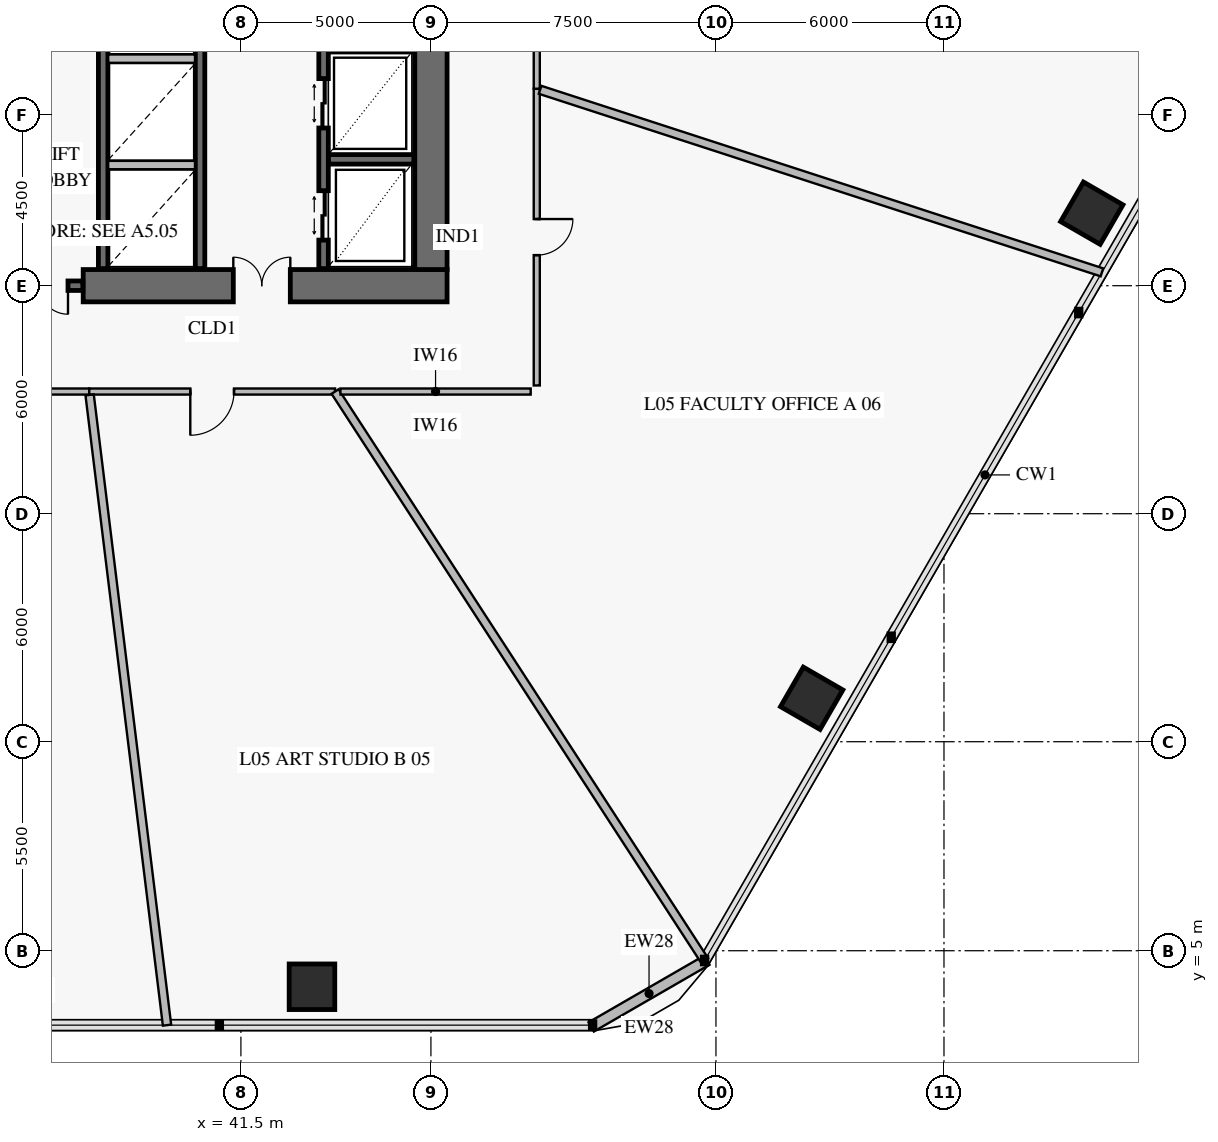
"""IFC4 building model, lengths in metres.
Left out: names, types, materials, properties, quantities, classifications, styles, units other than length and angle.
Written with IfcOpenShell. Run it as: python <this file> out.ifc"""

import sys

from ifc_helpers import new_model, si_unit, direction, frame, frame_2d, origin, origin_2d, place, context, subcontext, project, spatial, rectangle, extrude, element, fill, save


model = new_model("IFC4")
c1 = context("Model", 3, precision=1e-05, world=origin(), true_north=direction((0.0, 1.0)))
c2 = subcontext(c1, "Body", "Model", "MODEL_VIEW")
j1 = project(units=[si_unit("LENGTHUNIT", "METRE"), si_unit("PLANEANGLEUNIT", "RADIAN")], contexts=[c1])
p1 = place(None, origin())
s1 = spatial("IfcSite", under=j1, at=p1, CompositionType="ELEMENT")
p2 = place(p1, origin())
s2 = spatial("IfcBuilding", under=s1, at=p2, CompositionType="ELEMENT")
p3 = place(p2, frame((0.0, 0.0, 20.4)))
s3 = spatial("IfcBuildingStorey", under=s2, at=p3, CompositionType="ELEMENT", Elevation=20.4)
p4 = place(p3, frame((37.35, 22.5, 0.0), z_axis=(0.0, 0.0, 1.0), x_axis=(1.0, 0.0, 0.0)))
e1 = element("IfcWall", 1, at=p4, inside=s3, PredefinedType="SHEAR", context=c2, shape_type="SweptSolid", body=[
    extrude(rectangle(XDim=9.575, YDim=0.85, at=frame_2d((4.788, 0.0))), origin(), (0.0, 0.0, 1.0), 4.2),
])
p5 = place(p4, frame((3.95, 0.0, 0.0)))
e2 = element("IfcOpeningElement", 2, at=p5, cuts=e1, PredefinedType="OPENING", context=c2, shape_type="SweptSolid", body=[
    extrude(rectangle(XDim=1.5, YDim=2.15, at=frame_2d((0.75, 1.075))), frame((0.0, 0.437, 0.0), z_axis=(0.0, -1.0, 0.0), x_axis=(1.0, 0.0, 0.0)), (0.0, 0.0, 1.0), 0.874),
])
p6 = place(p3, frame((46.5, 22.925, 0.0), z_axis=(0.0, 0.0, 1.0), x_axis=(0.0, 1.0, 0.0)))
e3 = element("IfcWall", 3, at=p6, inside=s3, PredefinedType="SHEAR", context=c2, shape_type="SweptSolid", body=[
    extrude(rectangle(XDim=18.15, YDim=0.85, at=frame_2d((9.075, 0.0))), origin(), (0.0, 0.0, 1.0), 4.2),
])
p7 = place(p6, frame((8.825, 0.0, 0.0)))
e4 = element("IfcOpeningElement", 4, at=p7, cuts=e3, PredefinedType="OPENING", context=c2, shape_type="SweptSolid", body=[
    extrude(rectangle(XDim=1.1, YDim=2.15, at=frame_2d((0.55, 1.075))), frame((0.0, 0.437, 0.0), z_axis=(0.0, -1.0, 0.0), x_axis=(1.0, 0.0, 0.0)), (0.0, 0.0, 1.0), 0.874),
])
for number, where, z_axis, x_axis in (
    (5, (43.37, 4.052, 0.0), (0.0, 0.0, 1.0), (1.0, 0.0, 0.0)),
    (6, (56.519, 11.643, 0.0), (0.0, 0.0, 1.0), (0.5, 0.866, 0.0)),
    (7, (63.889, 24.408, 0.0), (0.0, 0.0, 1.0), (0.5, 0.866, 0.0)),
):
    element("IfcColumn", number, at=place(p3, frame(where, z_axis=z_axis, x_axis=x_axis)), inside=s3, PredefinedType="COLUMN", context=c2, shape_type="SweptSolid", body=[
        extrude(rectangle(XDim=1.2, YDim=1.2, at=origin_2d()), origin(), (0.0, 0.0, 1.0), 3.92),
    ])
p8 = place(p3, frame((53.761, 4.751, 0.0), z_axis=(0.0, 0.0, 1.0), x_axis=(-0.866007452331, -0.500031091541, 0.0)))
e8 = element("IfcWall", 8, at=p8, inside=s3, PredefinedType="SOLIDWALL", context=c2, shape_type="SweptSolid", body=[
    extrude(rectangle(XDim=3.515, YDim=0.28, at=frame_2d((1.757, 0.0))), origin(), (0.0, 0.0, 1.0), 3.92),
])
p9 = place(p3, frame((35.06, 22.5, 0.0), z_axis=(0.0, 0.0, 1.0), x_axis=(1.0, 0.0, 0.0)))
e9 = element("IfcWall", 9, at=p9, inside=s3, PredefinedType="SOLIDWALL", context=c2, shape_type="SweptSolid", body=[
    extrude(rectangle(XDim=2.28, YDim=0.25, at=frame_2d((1.14, 0.0))), origin(), (0.0, 0.0, 1.0), 4.2),
])
p10 = place(p9, frame((0.39, 0.0, 0.0)))
e10 = element("IfcOpeningElement", 10, at=p10, cuts=e9, PredefinedType="OPENING", context=c2, shape_type="SweptSolid", body=[
    extrude(rectangle(XDim=1.5, YDim=2.15, at=frame_2d((0.75, 1.075))), frame((0.0, 0.137, 0.0), z_axis=(0.0, -1.0, 0.0), x_axis=(1.0, 0.0, 0.0)), (0.0, 0.0, 1.0), 0.274),
])
for number, where, z_axis, x_axis in (
    (11, (37.875, 22.95, 0.0), (0.0, 0.0, 1.0), (0.0, 1.0, 0.0)),
    (12, (40.425, 22.95, 0.0), (0.0, 0.0, 1.0), (0.0, 1.0, 0.0)),
):
    element("IfcWall", number, at=place(p3, frame(where, z_axis=z_axis, x_axis=x_axis)), inside=s3, PredefinedType="SOLIDWALL", context=c2, shape_type="SweptSolid", body=[
        extrude(rectangle(XDim=8.2, YDim=0.25, at=frame_2d((4.1, 0.0))), origin(), (0.0, 0.0, 1.0), 4.2),
    ])
for number, where, z_axis, x_axis in (
    (13, (43.8, 25.825, 0.0), (0.0, 0.0, 1.0), (1.0, 0.0, 0.0)),
    (14, (43.8, 28.775, 0.0), (0.0, 0.0, 1.0), (1.0, 0.0, 0.0)),
):
    element("IfcWall", number, at=place(p3, frame(where, z_axis=z_axis, x_axis=x_axis)), inside=s3, PredefinedType="SOLIDWALL", context=c2, shape_type="SweptSolid", body=[
        extrude(rectangle(XDim=2.25, YDim=0.25, at=frame_2d((1.125, 0.0))), origin(), (0.0, 0.0, 1.0), 4.2),
    ])
p11 = place(p3, frame((43.675, 22.95, 0.0), z_axis=(0.0, 0.0, 1.0), x_axis=(0.0, 1.0, 0.0)))
e15 = element("IfcWall", 15, at=p11, inside=s3, PredefinedType="SOLIDWALL", context=c2, shape_type="SweptSolid", body=[
    extrude(rectangle(XDim=8.2, YDim=0.25, at=frame_2d((4.1, 0.0))), origin(), (0.0, 0.0, 1.0), 4.2),
])
p12 = place(p11, frame((0.75, 0.0, 0.0)))
e16 = element("IfcOpeningElement", 16, at=p12, cuts=e15, PredefinedType="OPENING", context=c2, shape_type="SweptSolid", body=[
    extrude(rectangle(XDim=1.3, YDim=2.3, at=frame_2d((0.65, 1.15))), frame((0.0, 0.137, 0.0), z_axis=(0.0, -1.0, 0.0), x_axis=(1.0, 0.0, 0.0)), (0.0, 0.0, 1.0), 0.274),
])
p13 = place(p11, frame((3.7, 0.0, 0.0)))
e17 = element("IfcOpeningElement", 17, at=p13, cuts=e15, PredefinedType="OPENING", context=c2, shape_type="SweptSolid", body=[
    extrude(rectangle(XDim=1.3, YDim=2.3, at=frame_2d((0.65, 1.15))), frame((0.0, 0.137, 0.0), z_axis=(0.0, -1.0, 0.0), x_axis=(1.0, 0.0, 0.0)), (0.0, 0.0, 1.0), 0.274),
])
p14 = place(p11, frame((6.62, 0.0, 0.0)))
e18 = element("IfcOpeningElement", 18, at=p14, cuts=e15, PredefinedType="OPENING", context=c2, shape_type="SweptSolid", body=[
    extrude(rectangle(XDim=0.9, YDim=2.1, at=frame_2d((0.45, 1.05))), frame((0.0, 0.137, 0.0), z_axis=(0.0, -1.0, 0.0), x_axis=(1.0, 0.0, 0.0)), (0.0, 0.0, 1.0), 0.274),
])
p15 = place(p3, frame((31.77, 19.715, 0.0), z_axis=(0.0, 0.0, 1.0), x_axis=(1.0, 0.0, 0.0)))
e19 = element("IfcWall", 19, at=p15, inside=s3, PredefinedType="PARTITIONING", context=c2, shape_type="SweptSolid", body=[
    extrude(rectangle(XDim=5.738, YDim=0.16, at=frame_2d((2.869, 0.0))), origin(), (0.0, 0.0, 1.0), 3.22),
])
p16 = place(p15, frame((2.294, 0.0, 0.0)))
e20 = element("IfcOpeningElement", 20, at=p16, cuts=e19, PredefinedType="OPENING", context=c2, shape_type="SweptSolid", body=[
    extrude(rectangle(XDim=1.15, YDim=2.2, at=frame_2d((0.575, 1.1))), frame((0.0, 0.092, 0.0), z_axis=(0.0, -1.0, 0.0), x_axis=(1.0, 0.0, 0.0)), (0.0, 0.0, 1.0), 0.184),
])
p17 = place(p3, frame((37.508, 19.715, 0.0), z_axis=(0.0, 0.0, 1.0), x_axis=(1.0, 0.0, 0.0)))
e21 = element("IfcWall", 21, at=p17, inside=s3, PredefinedType="PARTITIONING", context=c2, shape_type="SweptSolid", body=[
    extrude(rectangle(XDim=6.47, YDim=0.16, at=frame_2d((3.235, 0.0))), origin(), (0.0, 0.0, 1.0), 3.22),
])
p18 = place(p17, frame((2.66, 0.0, 0.0)))
e22 = element("IfcOpeningElement", 22, at=p18, cuts=e21, PredefinedType="OPENING", context=c2, shape_type="SweptSolid", body=[
    extrude(rectangle(XDim=1.15, YDim=2.2, at=frame_2d((0.575, 1.1))), frame((0.0, 0.092, 0.0), z_axis=(0.0, -1.0, 0.0), x_axis=(1.0, 0.0, 0.0)), (0.0, 0.0, 1.0), 0.184),
])
p19 = place(p3, frame((49.285, 19.875, 0.0), z_axis=(0.0, 0.0, 1.0), x_axis=(0.0, 1.0, 0.0)))
e23 = element("IfcWall", 23, at=p19, inside=s3, PredefinedType="PARTITIONING", context=c2, shape_type="SweptSolid", body=[
    extrude(rectangle(XDim=7.808, YDim=0.16, at=frame_2d((3.904, 0.0))), origin(), (0.0, 0.0, 1.0), 3.92),
])
p20 = place(p19, frame((3.429, 0.0, 0.0)))
e24 = element("IfcOpeningElement", 24, at=p20, cuts=e23, PredefinedType="OPENING", context=c2, shape_type="SweptSolid", body=[
    extrude(rectangle(XDim=0.95, YDim=2.1, at=frame_2d((0.475, 1.05))), frame((0.0, 0.092, 0.0), z_axis=(0.0, -1.0, 0.0), x_axis=(1.0, 0.0, 0.0)), (0.0, 0.0, 1.0), 0.184),
])
p21 = place(p3, frame((49.285, 27.683, 0.0), z_axis=(0.0, 0.0, 1.0), x_axis=(0.0, 1.0, 0.0)))
e25 = element("IfcWall", 25, at=p21, inside=s3, PredefinedType="PARTITIONING", context=c2, shape_type="SweptSolid", body=[
    extrude(rectangle(XDim=9.416, YDim=0.16, at=frame_2d((4.708, 0.0))), origin(), (0.0, 0.0, 1.0), 3.22),
])
p22 = place(p21, frame((4.233, 0.0, 0.0)))
e26 = element("IfcOpeningElement", 26, at=p22, cuts=e25, PredefinedType="OPENING", context=c2, shape_type="SweptSolid", body=[
    extrude(rectangle(XDim=0.95, YDim=2.1, at=frame_2d((0.475, 1.05))), frame((0.0, 0.092, 0.0), z_axis=(0.0, -1.0, 0.0), x_axis=(1.0, 0.0, 0.0)), (0.0, 0.0, 1.0), 0.184),
])
for number, where, z_axis, x_axis in (
    (27, (38.008, 25.675, 0.0), (0.0, 0.0, 1.0), (1.0, 0.0, 0.0)),
    (28, (38.008, 28.475, 0.0), (0.0, 0.0, 1.0), (1.0, 0.0, 0.0)),
):
    element("IfcWall", number, at=place(p3, frame(where, z_axis=z_axis, x_axis=x_axis)), inside=s3, PredefinedType="PARTITIONING", context=c2, shape_type="SweptSolid", body=[
        extrude(rectangle(XDim=2.284, YDim=0.22, at=frame_2d((1.142, 0.0))), origin(), (0.0, 0.0, 1.0), 3.92),
    ])
p23 = place(p3, frame((37.519, 19.627, 0.0), z_axis=(0.0, 0.0, 1.0), x_axis=(0.121865797427, -0.992546587026, 0.0)))
e29 = element("IfcWall", 29, at=p23, inside=s3, PredefinedType="PARTITIONING", context=c2, shape_type="SweptSolid", body=[
    extrude(rectangle(XDim=16.71, YDim=0.22, at=frame_2d((8.355, 0.0))), origin(), (0.0, 0.0, 1.0), 3.17),
])
p24 = place(p3, frame((43.978, 19.715, 0.0), z_axis=(0.0, 0.0, 1.0), x_axis=(0.544630677499, -0.838675995321, 0.0)))
e30 = element("IfcWall", 30, at=p24, inside=s3, PredefinedType="PARTITIONING", context=c2, shape_type="SweptSolid", body=[
    extrude(rectangle(XDim=17.853, YDim=0.22, at=frame_2d((8.926, 0.0))), origin(), (0.0, 0.0, 1.0), 3.17),
])
p25 = place(p3, frame((49.373, 27.655, 0.0), z_axis=(0.0, 0.0, 1.0), x_axis=(0.951055880984, -0.309018949654, 0.0)))
e31 = element("IfcWall", 31, at=p25, inside=s3, PredefinedType="PARTITIONING", context=c2, shape_type="SweptSolid", body=[
    extrude(rectangle(XDim=15.544, YDim=0.22, at=frame_2d((7.772, 0.0))), origin(), (0.0, 0.0, 1.0), 3.17),
])
p26 = place(p3, frame((44.119, 19.715, 0.0), z_axis=(0.0, 0.0, 1.0), x_axis=(1.0, 0.0, 0.0)))
e32 = element("IfcWall", 32, at=p26, inside=s3, PredefinedType="PARTITIONING", context=c2, shape_type="SweptSolid", body=[
    extrude(rectangle(XDim=5.006, YDim=0.16, at=frame_2d((2.503, 0.0))), origin(), (0.0, 0.0, 1.0), 3.22),
])
p27 = place(p5, origin())
e33 = element("IfcDoor", 33, at=p27, inside=s3, OperationType="DOUBLE_DOOR_SINGLE_SWING", PredefinedType="DOOR", context=c2, shape_type="SweptSolid", body=[
    extrude(rectangle(XDim=1.5, YDim=2.15, at=frame_2d((0.75, 1.075))), frame((0.0, 0.025, 0.0), z_axis=(0.0, -1.0, 0.0), x_axis=(1.0, 0.0, 0.0)), (0.0, 0.0, 1.0), 0.05),
])
fill(e2, e33)
p28 = place(p10, frame((1.5, 0.0, 0.0), z_axis=(0.0, 0.0, 1.0), x_axis=(-1.0, 0.0, 0.0)))
e34 = element("IfcDoor", 34, at=p28, inside=s3, OperationType="DOUBLE_DOOR_SINGLE_SWING", PredefinedType="DOOR", context=c2, shape_type="SweptSolid", body=[
    extrude(rectangle(XDim=1.5, YDim=2.15, at=frame_2d((0.75, 1.075))), frame((0.0, 0.025, 0.0), z_axis=(0.0, -1.0, 0.0), x_axis=(1.0, 0.0, 0.0)), (0.0, 0.0, 1.0), 0.05),
])
fill(e10, e34)
p29 = place(p12, origin())
e35 = element("IfcDoor", 35, at=p29, inside=s3, OperationType="DOUBLE_DOOR_SLIDING", PredefinedType="DOOR", context=c2, shape_type="SweptSolid", body=[
    extrude(rectangle(XDim=1.3, YDim=2.3, at=frame_2d((0.65, 1.15))), frame((0.0, 0.025, 0.0), z_axis=(0.0, -1.0, 0.0), x_axis=(1.0, 0.0, 0.0)), (0.0, 0.0, 1.0), 0.05),
])
fill(e16, e35)
p30 = place(p13, origin())
e36 = element("IfcDoor", 36, at=p30, inside=s3, OperationType="DOUBLE_DOOR_SLIDING", PredefinedType="DOOR", context=c2, shape_type="SweptSolid", body=[
    extrude(rectangle(XDim=1.3, YDim=2.3, at=frame_2d((0.65, 1.15))), frame((0.0, 0.025, 0.0), z_axis=(0.0, -1.0, 0.0), x_axis=(1.0, 0.0, 0.0)), (0.0, 0.0, 1.0), 0.05),
])
fill(e17, e36)
p31 = place(p18, frame((1.15, 0.0, 0.0), z_axis=(0.0, 0.0, 1.0), x_axis=(-1.0, 0.0, 0.0)))
e37 = element("IfcDoor", 37, at=p31, inside=s3, OperationType="SINGLE_SWING_RIGHT", PredefinedType="DOOR", context=c2, shape_type="SweptSolid", body=[
    extrude(rectangle(XDim=1.15, YDim=2.2, at=frame_2d((0.575, 1.1))), frame((0.0, 0.025, 0.0), z_axis=(0.0, -1.0, 0.0), x_axis=(1.0, 0.0, 0.0)), (0.0, 0.0, 1.0), 0.05),
])
fill(e22, e37)
p32 = place(p20, frame((0.95, 0.0, 0.0), z_axis=(0.0, 0.0, 1.0), x_axis=(-1.0, 0.0, 0.0)))
e38 = element("IfcDoor", 38, at=p32, inside=s3, OperationType="SINGLE_SWING_LEFT", PredefinedType="DOOR", context=c2, shape_type="SweptSolid", body=[
    extrude(rectangle(XDim=0.95, YDim=2.1, at=frame_2d((0.475, 1.05))), frame((0.0, 0.025, 0.0), z_axis=(0.0, -1.0, 0.0), x_axis=(1.0, 0.0, 0.0)), (0.0, 0.0, 1.0), 0.05),
])
fill(e24, e38)
save(model, sys.argv[1])
